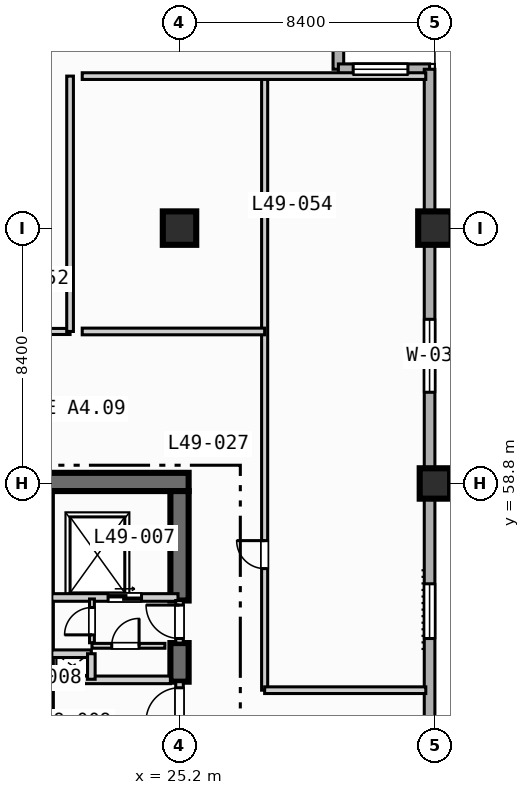
"""IFC4 building model, lengths in metres.
Left out: names, types, materials, properties, quantities, classifications, styles, units other than length and angle.
Written with IfcOpenShell. Run it as: python <this file> out.ifc"""

import sys

from ifc_helpers import new_model, si_unit, direction, frame, frame_2d, origin, origin_2d, place, context, subcontext, project, spatial, rectangle, extrude, element, fill, save


model = new_model("IFC4")
c1 = context("Model", 3, precision=1e-05, world=origin(), true_north=direction((0.0, 1.0)))
c2 = subcontext(c1, "Body", "Model", "MODEL_VIEW")
j1 = project(units=[si_unit("LENGTHUNIT", "METRE"), si_unit("PLANEANGLEUNIT", "RADIAN")], contexts=[c1])
p1 = place(None, origin())
s1 = spatial("IfcSite", under=j1, at=p1, CompositionType="ELEMENT")
p2 = place(p1, origin())
s2 = spatial("IfcBuilding", under=s1, at=p2, CompositionType="ELEMENT")
p3 = place(p2, frame((0.0, 0.0, 201.3)))
s3 = spatial("IfcBuildingStorey", under=s2, at=p3, CompositionType="ELEMENT", Elevation=201.3)
p4 = place(p3, frame((20.5, 58.85, 0.0), z_axis=(0.0, 0.0, 1.0), x_axis=(1.0, 0.0, 0.0)))
e1 = element("IfcWall", 1, at=p4, inside=s3, PredefinedType="SHEAR", context=c2, shape_type="SweptSolid", body=[
    extrude(rectangle(XDim=5.0, YDim=0.6, at=frame_2d((2.5, 0.0))), origin(), (0.0, 0.0, 1.0), 3.47),
])
p5 = place(p3, frame((25.2, 52.28, 0.0), z_axis=(0.0, 0.0, 1.0), x_axis=(0.0, 1.0, 0.0)))
e2 = element("IfcWall", 2, at=p5, inside=s3, PredefinedType="SHEAR", context=c2, shape_type="SweptSolid", body=[
    extrude(rectangle(XDim=1.27, YDim=0.6, at=frame_2d((0.635, 0.0))), origin(), (0.0, 0.0, 1.0), 3.47),
])
p6 = place(p3, frame((25.2, 54.95, 0.0), z_axis=(0.0, 0.0, 1.0), x_axis=(0.0, 1.0, 0.0)))
e3 = element("IfcWall", 3, at=p6, inside=s3, PredefinedType="SHEAR", context=c2, shape_type="SweptSolid", body=[
    extrude(rectangle(XDim=3.6, YDim=0.6, at=frame_2d((1.8, 0.0))), origin(), (0.0, 0.0, 1.0), 3.47),
])
p7 = place(p3, frame((25.2, 67.2, 0.0), z_axis=(0.0, 0.0, 1.0), x_axis=(1.0, 0.0, 0.0)))
e4 = element("IfcColumn", 4, at=p7, inside=s3, PredefinedType="COLUMN", context=c2, shape_type="SweptSolid", body=[
    extrude(rectangle(XDim=1.1, YDim=1.1, at=origin_2d()), origin(), (0.0, 0.0, 1.0), 3.7),
])
p8 = place(p3, frame((33.6, 58.8, 0.0), z_axis=(0.0, 0.0, 1.0), x_axis=(1.0, 0.0, 0.0)))
e5 = element("IfcColumn", 5, at=p8, inside=s3, PredefinedType="COLUMN", context=c2, shape_type="SweptSolid", body=[
    extrude(rectangle(XDim=1.0, YDim=1.0, at=origin_2d()), origin(), (0.0, 0.0, 1.0), 3.7),
])
p9 = place(p3, frame((33.6, 67.2, 0.0), z_axis=(0.0, 0.0, 1.0), x_axis=(1.0, 0.0, 0.0)))
e6 = element("IfcColumn", 6, at=p9, inside=s3, PredefinedType="COLUMN", context=c2, shape_type="SweptSolid", body=[
    extrude(rectangle(XDim=1.1, YDim=1.1, at=origin_2d()), origin(), (0.0, 0.0, 1.0), 3.7),
])
p10 = place(p3, frame((30.425, 75.425, 0.0), z_axis=(0.0, 0.0, 1.0), x_axis=(0.0, -1.0, 0.0)))
e7 = element("IfcWall", 7, at=p10, inside=s3, PredefinedType="STANDARD", context=c2, shape_type="SweptSolid", body=[
    extrude(rectangle(XDim=3.0, YDim=0.35, at=frame_2d((1.5, 0.0))), origin(), (0.0, 0.0, 1.0), 3.47),
])
p11 = place(p3, frame((30.425, 72.425, 0.0), z_axis=(0.0, 0.0, 1.0), x_axis=(1.0, 0.0, 0.0)))
e8 = element("IfcWall", 8, at=p11, inside=s3, PredefinedType="STANDARD", context=c2, shape_type="SweptSolid", body=[
    extrude(rectangle(XDim=3.0, YDim=0.35, at=frame_2d((1.5, 0.0))), origin(), (0.0, 0.0, 1.0), 3.47),
])
p12 = place(p11, frame((0.488, 0.0, 0.85)))
e9 = element("IfcOpeningElement", 9, at=p12, cuts=e8, PredefinedType="OPENING", context=c2, shape_type="SweptSolid", body=[
    extrude(rectangle(XDim=1.8, YDim=1.8, at=frame_2d((0.9, 0.9))), frame((0.0, 0.185, 0.0), z_axis=(0.0, -1.0, 0.0), x_axis=(1.0, 0.0, 0.0)), (0.0, 0.0, 1.0), 0.37),
])
p13 = place(p3, frame((33.425, 72.425, 0.0), z_axis=(0.0, 0.0, 1.0), x_axis=(0.0, -1.0, 0.0)))
e10 = element("IfcWall", 10, at=p13, inside=s3, PredefinedType="STANDARD", context=c2, shape_type="SweptSolid", body=[
    extrude(rectangle(XDim=39.0, YDim=0.35, at=frame_2d((19.5, 0.0))), origin(), (0.0, 0.0, 1.0), 3.47),
])
p14 = place(p13, frame((33.725, 0.0, 0.85)))
e11 = element("IfcOpeningElement", 11, at=p14, cuts=e10, PredefinedType="OPENING", context=c2, shape_type="SweptSolid", body=[
    extrude(rectangle(XDim=1.8, YDim=1.8, at=frame_2d((0.9, 0.9))), frame((0.0, 0.185, 0.0), z_axis=(0.0, -1.0, 0.0), x_axis=(1.0, 0.0, 0.0)), (0.0, 0.0, 1.0), 0.37),
])
p15 = place(p13, frame((16.925, 0.0, 0.85)))
e12 = element("IfcOpeningElement", 12, at=p15, cuts=e10, PredefinedType="OPENING", context=c2, shape_type="SweptSolid", body=[
    extrude(rectangle(XDim=1.8, YDim=1.8, at=frame_2d((0.9, 0.9))), frame((0.0, 0.185, 0.0), z_axis=(0.0, -1.0, 0.0), x_axis=(1.0, 0.0, 0.0)), (0.0, 0.0, 1.0), 0.37),
])
p16 = place(p13, frame((8.225, 0.0, 0.85)))
e13 = element("IfcOpeningElement", 13, at=p16, cuts=e10, PredefinedType="OPENING", context=c2, shape_type="SweptSolid", body=[
    extrude(rectangle(XDim=2.4, YDim=1.95, at=frame_2d((1.2, 0.975))), frame((0.0, 0.185, 0.0), z_axis=(0.0, -1.0, 0.0), x_axis=(1.0, 0.0, 0.0)), (0.0, 0.0, 1.0), 0.37),
])
p17 = place(p3, frame((25.2, 50.8, 0.0), z_axis=(0.0, 0.0, 1.0), x_axis=(0.0, 1.0, 0.0)))
e14 = element("IfcWall", 14, at=p17, inside=s3, PredefinedType="SOLIDWALL", context=c2, shape_type="SweptSolid", body=[
    extrude(rectangle(XDim=1.48, YDim=0.25, at=frame_2d((0.74, 0.0))), origin(), (0.0, 0.0, 1.0), 3.47),
])
p18 = place(p17, frame((0.18, 0.0, 0.0)))
e15 = element("IfcOpeningElement", 15, at=p18, cuts=e14, PredefinedType="OPENING", context=c2, shape_type="SweptSolid", body=[
    extrude(rectangle(XDim=1.1, YDim=2.15, at=frame_2d((0.55, 1.075))), frame((0.0, 0.135, 0.0), z_axis=(0.0, -1.0, 0.0), x_axis=(1.0, 0.0, 0.0)), (0.0, 0.0, 1.0), 0.27),
])
p19 = place(p3, frame((21.0, 52.34, 0.0), z_axis=(0.0, 0.0, 1.0), x_axis=(1.0, 0.0, 0.0)))
e16 = element("IfcWall", 16, at=p19, inside=s3, PredefinedType="SOLIDWALL", context=c2, shape_type="SweptSolid", body=[
    extrude(rectangle(XDim=3.9, YDim=0.25, at=frame_2d((1.95, 0.0))), origin(), (0.0, 0.0, 1.0), 3.47),
])
p20 = place(p3, frame((21.0, 55.05, 0.0), z_axis=(0.0, 0.0, 1.0), x_axis=(1.0, 0.0, 0.0)))
e17 = element("IfcWall", 17, at=p20, inside=s3, PredefinedType="SOLIDWALL", context=c2, shape_type="SweptSolid", body=[
    extrude(rectangle(XDim=4.15, YDim=0.25, at=frame_2d((2.075, 0.0))), origin(), (0.0, 0.0, 1.0), 3.47),
])
p21 = place(p20, frame((1.85, 0.0, 0.0)))
e18 = element("IfcOpeningElement", 18, at=p21, cuts=e17, PredefinedType="OPENING", context=c2, shape_type="SweptSolid", body=[
    extrude(rectangle(XDim=1.1, YDim=2.15, at=frame_2d((0.55, 1.075))), frame((0.0, 0.135, 0.0), z_axis=(0.0, -1.0, 0.0), x_axis=(1.0, 0.0, 0.0)), (0.0, 0.0, 1.0), 0.27),
])
p22 = place(p3, frame((25.2, 53.55, 0.0), z_axis=(0.0, 0.0, 1.0), x_axis=(0.0, 1.0, 0.0)))
e19 = element("IfcWall", 19, at=p22, inside=s3, PredefinedType="SOLIDWALL", context=c2, shape_type="SweptSolid", body=[
    extrude(rectangle(XDim=1.4, YDim=0.25, at=frame_2d((0.7, 0.0))), origin(), (0.0, 0.0, 1.0), 3.47),
])
p23 = place(p22, frame((0.15, 0.0, 0.0)))
e20 = element("IfcOpeningElement", 20, at=p23, cuts=e19, PredefinedType="OPENING", context=c2, shape_type="SweptSolid", body=[
    extrude(rectangle(XDim=1.1, YDim=2.15, at=frame_2d((0.55, 1.075))), frame((0.0, 0.135, 0.0), z_axis=(0.0, -1.0, 0.0), x_axis=(1.0, 0.0, 0.0)), (0.0, 0.0, 1.0), 0.27),
])
p24 = place(p3, frame((21.0, 53.2, 0.0), z_axis=(0.0, 0.0, 1.0), x_axis=(1.0, 0.0, 0.0)))
e21 = element("IfcWall", 21, at=p24, inside=s3, PredefinedType="SOLIDWALL", context=c2, shape_type="SweptSolid", body=[
    extrude(rectangle(XDim=1.3, YDim=0.25, at=frame_2d((0.65, 0.0))), origin(), (0.0, 0.0, 1.0), 3.47),
])
p25 = place(p3, frame((22.3, 52.36, 0.0), z_axis=(0.0, 0.0, 1.0), x_axis=(0.0, 1.0, 0.0)))
e22 = element("IfcWall", 22, at=p25, inside=s3, PredefinedType="SOLIDWALL", context=c2, shape_type="SweptSolid", body=[
    extrude(rectangle(XDim=0.84, YDim=0.25, at=frame_2d((0.42, 0.0))), origin(), (0.0, 0.0, 1.0), 3.47),
])
p26 = place(p3, frame((22.32, 53.56, 0.0), z_axis=(0.0, 0.0, 1.0), x_axis=(0.0, 1.0, 0.0)))
e23 = element("IfcWall", 23, at=p26, inside=s3, PredefinedType="PARTITIONING", context=c2, shape_type="SweptSolid", body=[
    extrude(rectangle(XDim=1.44, YDim=0.16, at=frame_2d((0.72, 0.0))), origin(), (0.0, 0.0, 1.0), 3.47),
])
p27 = place(p26, frame((0.26, 0.0, 0.0)))
e24 = element("IfcOpeningElement", 24, at=p27, cuts=e23, PredefinedType="OPENING", context=c2, shape_type="SweptSolid", body=[
    extrude(rectangle(XDim=0.9, YDim=2.1, at=frame_2d((0.45, 1.05))), frame((0.0, 0.09, 0.0), z_axis=(0.0, -1.0, 0.0), x_axis=(1.0, 0.0, 0.0)), (0.0, 0.0, 1.0), 0.18),
])
p28 = place(p3, frame((22.32, 53.46, 0.0), z_axis=(0.0, 0.0, 1.0), x_axis=(1.0, 0.0, 0.0)))
e25 = element("IfcWall", 25, at=p28, inside=s3, PredefinedType="PARTITIONING", context=c2, shape_type="SweptSolid", body=[
    extrude(rectangle(XDim=2.4, YDim=0.16, at=frame_2d((1.2, 0.0))), origin(), (0.0, 0.0, 1.0), 3.47),
])
p29 = place(p28, frame((0.65, 0.0, 0.0)))
e26 = element("IfcOpeningElement", 26, at=p29, cuts=e25, PredefinedType="OPENING", context=c2, shape_type="SweptSolid", body=[
    extrude(rectangle(XDim=0.9, YDim=2.1, at=frame_2d((0.45, 1.05))), frame((0.0, 0.09, 0.0), z_axis=(0.0, -1.0, 0.0), x_axis=(1.0, 0.0, 0.0)), (0.0, 0.0, 1.0), 0.18),
])
p30 = place(p3, frame((3.4, 63.8, 0.0), z_axis=(0.0, 0.0, 1.0), x_axis=(1.0, 0.0, 0.0)))
e27 = element("IfcWall", 27, at=p30, inside=s3, PredefinedType="PARTITIONING", context=c2, shape_type="SweptSolid", body=[
    extrude(rectangle(XDim=18.2, YDim=0.2, at=frame_2d((9.1, 0.0))), origin(), (0.0, 0.0, 1.0), 3.47),
])
p31 = place(p30, frame((4.05, 0.0, 0.0)))
e28 = element("IfcOpeningElement", 28, at=p31, cuts=e27, PredefinedType="OPENING", context=c2, shape_type="SweptSolid", body=[
    extrude(rectangle(XDim=1.0, YDim=2.15, at=frame_2d((0.5, 1.075))), frame((0.0, 0.11, 0.0), z_axis=(0.0, -1.0, 0.0), x_axis=(1.0, 0.0, 0.0)), (0.0, 0.0, 1.0), 0.22),
])
p32 = place(p3, frame((21.6, 63.8, 0.0), z_axis=(0.0, 0.0, 1.0), x_axis=(0.0, 1.0, 0.0)))
e29 = element("IfcWall", 29, at=p32, inside=s3, PredefinedType="PARTITIONING", context=c2, shape_type="SweptSolid", body=[
    extrude(rectangle(XDim=8.4, YDim=0.22, at=frame_2d((4.2, 0.0))), origin(), (0.0, 0.0, 1.0), 3.47),
])
p33 = place(p3, frame((28.0, 52.0, 0.0), z_axis=(0.0, 0.0, 1.0), x_axis=(0.0, 1.0, 0.0)))
e30 = element("IfcWall", 30, at=p33, inside=s3, PredefinedType="PARTITIONING", context=c2, shape_type="SweptSolid", body=[
    extrude(rectangle(XDim=20.2, YDim=0.2, at=frame_2d((10.1, 0.0))), origin(), (0.0, 0.0, 1.0), 3.47),
])
p34 = place(p33, frame((4.0, 0.0, 0.0)))
e31 = element("IfcOpeningElement", 31, at=p34, cuts=e30, PredefinedType="OPENING", context=c2, shape_type="SweptSolid", body=[
    extrude(rectangle(XDim=0.92, YDim=2.1, at=frame_2d((0.46, 1.05))), frame((0.0, 0.11, 0.0), z_axis=(0.0, -1.0, 0.0), x_axis=(1.0, 0.0, 0.0)), (0.0, 0.0, 1.0), 0.22),
])
p35 = place(p3, frame((28.0, 52.0, 0.0), z_axis=(0.0, 0.0, 1.0), x_axis=(1.0, 0.0, 0.0)))
e32 = element("IfcWall", 32, at=p35, inside=s3, PredefinedType="PARTITIONING", context=c2, shape_type="SweptSolid", body=[
    extrude(rectangle(XDim=5.3, YDim=0.22, at=frame_2d((2.65, 0.0))), origin(), (0.0, 0.0, 1.0), 3.47),
])
p36 = place(p3, frame((22.0, 72.2, 0.0), z_axis=(0.0, 0.0, 1.0), x_axis=(1.0, 0.0, 0.0)))
e33 = element("IfcWall", 33, at=p36, inside=s3, PredefinedType="PARTITIONING", context=c2, shape_type="SweptSolid", body=[
    extrude(rectangle(XDim=11.3, YDim=0.22, at=frame_2d((5.65, 0.0))), origin(), (0.0, 0.0, 1.0), 3.47),
])
p37 = place(p3, frame((22.0, 63.8, 0.0), z_axis=(0.0, 0.0, 1.0), x_axis=(1.0, 0.0, 0.0)))
e34 = element("IfcWall", 34, at=p37, inside=s3, PredefinedType="PARTITIONING", context=c2, shape_type="SweptSolid", body=[
    extrude(rectangle(XDim=6.0, YDim=0.22, at=frame_2d((3.0, 0.0))), origin(), (0.0, 0.0, 1.0), 3.47),
])
p38 = place(p12, origin())
e35 = element("IfcWindow", 35, at=p38, inside=s3, PartitioningType="SINGLE_PANEL", PredefinedType="WINDOW", context=c2, shape_type="SweptSolid", body=[
    extrude(rectangle(XDim=1.8, YDim=1.8, at=frame_2d((0.9, 0.9))), frame((0.0, 0.03, 0.0), z_axis=(0.0, -1.0, 0.0), x_axis=(1.0, 0.0, 0.0)), (0.0, 0.0, 1.0), 0.06),
])
fill(e9, e35)
p39 = place(p15, origin())
e36 = element("IfcWindow", 36, at=p39, inside=s3, PartitioningType="SINGLE_PANEL", PredefinedType="WINDOW", context=c2, shape_type="SweptSolid", body=[
    extrude(rectangle(XDim=1.8, YDim=1.8, at=frame_2d((0.9, 0.9))), frame((0.0, 0.03, 0.0), z_axis=(0.0, -1.0, 0.0), x_axis=(1.0, 0.0, 0.0)), (0.0, 0.0, 1.0), 0.06),
])
fill(e12, e36)
p40 = place(p16, origin())
e37 = element("IfcWindow", 37, at=p40, inside=s3, PartitioningType="SINGLE_PANEL", PredefinedType="WINDOW", context=c2, shape_type="SweptSolid", body=[
    extrude(rectangle(XDim=2.4, YDim=1.95, at=frame_2d((1.2, 0.975))), frame((0.0, 0.03, 0.0), z_axis=(0.0, -1.0, 0.0), x_axis=(1.0, 0.0, 0.0)), (0.0, 0.0, 1.0), 0.06),
])
fill(e13, e37)
p41 = place(p18, origin())
e38 = element("IfcDoor", 38, at=p41, inside=s3, OperationType="SINGLE_SWING_LEFT", PredefinedType="DOOR", context=c2, shape_type="SweptSolid", body=[
    extrude(rectangle(XDim=1.1, YDim=2.15, at=frame_2d((0.55, 1.075))), frame((0.0, 0.025, 0.0), z_axis=(0.0, -1.0, 0.0), x_axis=(1.0, 0.0, 0.0)), (0.0, 0.0, 1.0), 0.05),
])
fill(e15, e38)
p42 = place(p21, origin())
e39 = element("IfcDoor", 39, at=p42, inside=s3, OperationType="SLIDING_TO_LEFT", PredefinedType="DOOR", context=c2, shape_type="SweptSolid", body=[
    extrude(rectangle(XDim=1.1, YDim=2.15, at=frame_2d((0.55, 1.075))), frame((0.0, 0.025, 0.0), z_axis=(0.0, -1.0, 0.0), x_axis=(1.0, 0.0, 0.0)), (0.0, 0.0, 1.0), 0.05),
])
fill(e18, e39)
p43 = place(p23, origin())
e40 = element("IfcDoor", 40, at=p43, inside=s3, OperationType="SINGLE_SWING_RIGHT", PredefinedType="DOOR", context=c2, shape_type="SweptSolid", body=[
    extrude(rectangle(XDim=1.1, YDim=2.15, at=frame_2d((0.55, 1.075))), frame((0.0, 0.025, 0.0), z_axis=(0.0, -1.0, 0.0), x_axis=(1.0, 0.0, 0.0)), (0.0, 0.0, 1.0), 0.05),
])
fill(e20, e40)
p44 = place(p27, origin())
e41 = element("IfcDoor", 41, at=p44, inside=s3, OperationType="SINGLE_SWING_LEFT", PredefinedType="DOOR", context=c2, shape_type="SweptSolid", body=[
    extrude(rectangle(XDim=0.9, YDim=2.1, at=frame_2d((0.45, 1.05))), frame((0.0, 0.025, 0.0), z_axis=(0.0, -1.0, 0.0), x_axis=(1.0, 0.0, 0.0)), (0.0, 0.0, 1.0), 0.05),
])
fill(e24, e41)
p45 = place(p29, origin())
e42 = element("IfcDoor", 42, at=p45, inside=s3, OperationType="SINGLE_SWING_RIGHT", PredefinedType="DOOR", context=c2, shape_type="SweptSolid", body=[
    extrude(rectangle(XDim=0.9, YDim=2.1, at=frame_2d((0.45, 1.05))), frame((0.0, 0.025, 0.0), z_axis=(0.0, -1.0, 0.0), x_axis=(1.0, 0.0, 0.0)), (0.0, 0.0, 1.0), 0.05),
])
fill(e26, e42)
p46 = place(p34, origin())
e43 = element("IfcDoor", 43, at=p46, inside=s3, OperationType="SINGLE_SWING_RIGHT", PredefinedType="DOOR", context=c2, shape_type="SweptSolid", body=[
    extrude(rectangle(XDim=0.92, YDim=2.1, at=frame_2d((0.46, 1.05))), frame((0.0, 0.025, 0.0), z_axis=(0.0, -1.0, 0.0), x_axis=(1.0, 0.0, 0.0)), (0.0, 0.0, 1.0), 0.05),
])
fill(e31, e43)
save(model, sys.argv[1])
